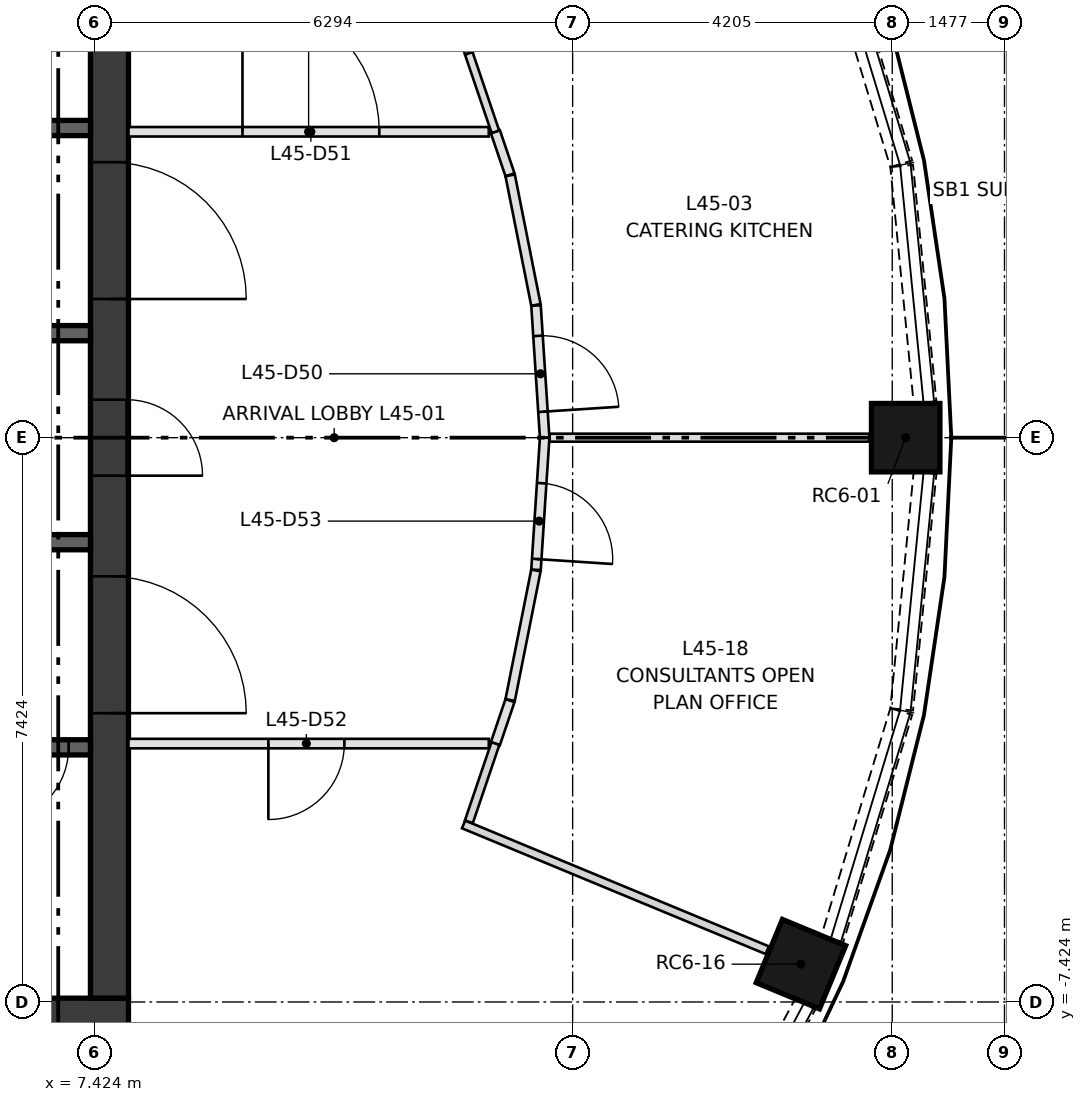
"""IFC4 building model, lengths in metres.
Left out: names, types, materials, properties, quantities, classifications, styles, units other than length and angle.
Written with IfcOpenShell. Run it as: python <this file> out.ifc"""

import sys

from ifc_helpers import new_model, si_unit, direction, frame, frame_2d, origin, origin_2d, place, context, subcontext, project, spatial, rectangle, extrude, element, fill, save


model = new_model("IFC4")
c1 = context("Model", 3, precision=1e-05, world=origin(), true_north=direction((0.0, 1.0)))
c2 = subcontext(c1, "Body", "Model", "MODEL_VIEW")
j1 = project(units=[si_unit("LENGTHUNIT", "METRE"), si_unit("PLANEANGLEUNIT", "RADIAN")], contexts=[c1])
p1 = place(None, origin())
s1 = spatial("IfcSite", under=j1, at=p1, CompositionType="ELEMENT")
p2 = place(p1, origin())
s2 = spatial("IfcBuilding", under=s1, at=p2, CompositionType="ELEMENT")
p3 = place(p2, frame((0.0, 0.0, 170.9)))
s3 = spatial("IfcBuildingStorey", under=s2, at=p3, CompositionType="ELEMENT", Elevation=170.9)
for number, where, z_axis, x_axis in (
    (1, (18.1, 0.0, 0.0), (0.0, 0.0, 1.0), (1.0, 0.0, 0.0)),
    (2, (16.722, -6.927, 0.0), (0.0, 0.0, 1.0), (0.924, -0.383, 0.0)),
):
    element("IfcColumn", number, at=place(p3, frame(where, z_axis=z_axis, x_axis=x_axis)), inside=s3, PredefinedType="COLUMN", context=c2, shape_type="SweptSolid", body=[
        extrude(rectangle(XDim=0.9, YDim=0.9, at=origin_2d()), origin(), (0.0, 0.0, 1.0), 3.35),
    ])
p4 = place(p3, frame((-7.874, -7.624, 0.0), z_axis=(0.0, 0.0, 1.0), x_axis=(1.0, 0.0, 0.0)))
e3 = element("IfcWall", 3, at=p4, inside=s3, PredefinedType="SHEAR", context=c2, shape_type="SweptSolid", body=[
    extrude(rectangle(XDim=15.748, YDim=0.5, at=frame_2d((7.874, 0.0))), origin(), (0.0, 0.0, 1.0), 3.35),
])
p5 = place(p3, frame((7.624, -7.374, 0.0), z_axis=(0.0, 0.0, 1.0), x_axis=(0.0, 1.0, 0.0)))
e4 = element("IfcWall", 4, at=p5, inside=s3, PredefinedType="SHEAR", context=c2, shape_type="SweptSolid", body=[
    extrude(rectangle(XDim=14.748, YDim=0.5, at=frame_2d((7.374, 0.0))), origin(), (0.0, 0.0, 1.0), 3.35),
])
p6 = place(p5, frame((6.874, 0.0, 0.0)))
e5 = element("IfcOpeningElement", 5, at=p6, cuts=e4, PredefinedType="OPENING", context=c2, shape_type="SweptSolid", body=[
    extrude(rectangle(XDim=1.0, YDim=2.1, at=frame_2d((0.5, 1.05))), frame((0.0, 0.26, 0.0), z_axis=(0.0, -1.0, 0.0), x_axis=(1.0, 0.0, 0.0)), (0.0, 0.0, 1.0), 0.52),
])
p7 = place(p5, frame((3.75, 0.0, 0.0)))
e6 = element("IfcOpeningElement", 6, at=p7, cuts=e4, PredefinedType="OPENING", context=c2, shape_type="SweptSolid", body=[
    extrude(rectangle(XDim=1.8, YDim=2.1, at=frame_2d((0.9, 1.05))), frame((0.0, 0.26, 0.0), z_axis=(0.0, -1.0, 0.0), x_axis=(1.0, 0.0, 0.0)), (0.0, 0.0, 1.0), 0.52),
])
p8 = place(p5, frame((9.198, 0.0, 0.0)))
e7 = element("IfcOpeningElement", 7, at=p8, cuts=e4, PredefinedType="OPENING", context=c2, shape_type="SweptSolid", body=[
    extrude(rectangle(XDim=1.8, YDim=2.1, at=frame_2d((0.9, 1.05))), frame((0.0, 0.26, 0.0), z_axis=(0.0, -1.0, 0.0), x_axis=(1.0, 0.0, 0.0)), (0.0, 0.0, 1.0), 0.52),
])
p9 = place(p3, frame((-7.374, -4.074, 0.0), z_axis=(0.0, 0.0, 1.0), x_axis=(1.0, 0.0, 0.0)))
e8 = element("IfcWall", 8, at=p9, inside=s3, PredefinedType="SHEAR", context=c2, shape_type="SweptSolid", body=[
    extrude(rectangle(XDim=14.748, YDim=0.2, at=frame_2d((7.374, 0.0))), origin(), (0.0, 0.0, 1.0), 3.0),
])
p10 = place(p9, frame((1.319, 0.0, 0.0)))
e9 = element("IfcOpeningElement", 9, at=p10, cuts=e8, PredefinedType="OPENING", context=c2, shape_type="SweptSolid", body=[
    extrude(rectangle(XDim=1.1, YDim=2.1, at=frame_2d((0.55, 1.05))), frame((0.0, 0.11, 0.0), z_axis=(0.0, -1.0, 0.0), x_axis=(1.0, 0.0, 0.0)), (0.0, 0.0, 1.0), 0.22),
])
p11 = place(p9, frame((4.456, 0.0, 0.0)))
e10 = element("IfcOpeningElement", 10, at=p11, cuts=e8, PredefinedType="OPENING", context=c2, shape_type="SweptSolid", body=[
    extrude(rectangle(XDim=1.1, YDim=2.1, at=frame_2d((0.55, 1.05))), frame((0.0, 0.11, 0.0), z_axis=(0.0, -1.0, 0.0), x_axis=(1.0, 0.0, 0.0)), (0.0, 0.0, 1.0), 0.22),
])
p12 = place(p9, frame((7.551, 0.0, 0.0)))
e11 = element("IfcOpeningElement", 11, at=p12, cuts=e8, PredefinedType="OPENING", context=c2, shape_type="SweptSolid", body=[
    extrude(rectangle(XDim=1.0, YDim=2.1, at=frame_2d((0.5, 1.05))), frame((0.0, 0.11, 0.0), z_axis=(0.0, -1.0, 0.0), x_axis=(1.0, 0.0, 0.0)), (0.0, 0.0, 1.0), 0.22),
])
p13 = place(p9, frame((9.914, 0.0, 0.0)))
e12 = element("IfcOpeningElement", 12, at=p13, cuts=e8, PredefinedType="OPENING", context=c2, shape_type="SweptSolid", body=[
    extrude(rectangle(XDim=1.0, YDim=2.1, at=frame_2d((0.5, 1.05))), frame((0.0, 0.11, 0.0), z_axis=(0.0, -1.0, 0.0), x_axis=(1.0, 0.0, 0.0)), (0.0, 0.0, 1.0), 0.22),
])
p14 = place(p9, frame((11.688, 0.0, 0.0)))
e13 = element("IfcOpeningElement", 13, at=p14, cuts=e8, PredefinedType="OPENING", context=c2, shape_type="SweptSolid", body=[
    extrude(rectangle(XDim=1.0, YDim=2.1, at=frame_2d((0.5, 1.05))), frame((0.0, 0.11, 0.0), z_axis=(0.0, -1.0, 0.0), x_axis=(1.0, 0.0, 0.0)), (0.0, 0.0, 1.0), 0.22),
])
p15 = place(p9, frame((13.461, 0.0, 0.0)))
e14 = element("IfcOpeningElement", 14, at=p15, cuts=e8, PredefinedType="OPENING", context=c2, shape_type="SweptSolid", body=[
    extrude(rectangle(XDim=1.0, YDim=2.1, at=frame_2d((0.5, 1.05))), frame((0.0, 0.11, 0.0), z_axis=(0.0, -1.0, 0.0), x_axis=(1.0, 0.0, 0.0)), (0.0, 0.0, 1.0), 0.22),
])
p16 = place(p3, frame((0.0, 4.074, 0.0), z_axis=(0.0, 0.0, 1.0), x_axis=(1.0, 0.0, 0.0)))
e15 = element("IfcWall", 15, at=p16, inside=s3, PredefinedType="SHEAR", context=c2, shape_type="SweptSolid", body=[
    extrude(rectangle(XDim=7.374, YDim=0.2, at=frame_2d((3.687, 0.0))), origin(), (0.0, 0.0, 1.0), 3.0),
])
p17 = place(p16, frame((0.384, 0.0, 0.0)))
e16 = element("IfcOpeningElement", 16, at=p17, cuts=e15, PredefinedType="OPENING", context=c2, shape_type="SweptSolid", body=[
    extrude(rectangle(XDim=1.0, YDim=2.1, at=frame_2d((0.5, 1.05))), frame((0.0, 0.11, 0.0), z_axis=(0.0, -1.0, 0.0), x_axis=(1.0, 0.0, 0.0)), (0.0, 0.0, 1.0), 0.22),
])
p18 = place(p16, frame((2.153, 0.0, 0.0)))
e17 = element("IfcOpeningElement", 17, at=p18, cuts=e15, PredefinedType="OPENING", context=c2, shape_type="SweptSolid", body=[
    extrude(rectangle(XDim=1.0, YDim=2.1, at=frame_2d((0.5, 1.05))), frame((0.0, 0.11, 0.0), z_axis=(0.0, -1.0, 0.0), x_axis=(1.0, 0.0, 0.0)), (0.0, 0.0, 1.0), 0.22),
])
p19 = place(p16, frame((3.921, 0.0, 0.0)))
e18 = element("IfcOpeningElement", 18, at=p19, cuts=e15, PredefinedType="OPENING", context=c2, shape_type="SweptSolid", body=[
    extrude(rectangle(XDim=1.0, YDim=2.1, at=frame_2d((0.5, 1.05))), frame((0.0, 0.11, 0.0), z_axis=(0.0, -1.0, 0.0), x_axis=(1.0, 0.0, 0.0)), (0.0, 0.0, 1.0), 0.22),
])
p20 = place(p16, frame((5.79, 0.0, 0.0)))
e19 = element("IfcOpeningElement", 19, at=p20, cuts=e15, PredefinedType="OPENING", context=c2, shape_type="SweptSolid", body=[
    extrude(rectangle(XDim=0.8, YDim=2.1, at=frame_2d((0.4, 1.05))), frame((0.0, 0.11, 0.0), z_axis=(0.0, -1.0, 0.0), x_axis=(1.0, 0.0, 0.0)), (0.0, 0.0, 1.0), 0.22),
])
for number, where, z_axis, x_axis in (
    (20, (4.374, -1.375, 0.0), (0.0, 0.0, 1.0), (1.0, 0.0, 0.0)),
    (21, (4.374, 1.375, 0.0), (0.0, 0.0, 1.0), (1.0, 0.0, 0.0)),
):
    element("IfcWall", number, at=place(p3, frame(where, z_axis=z_axis, x_axis=x_axis)), inside=s3, PredefinedType="SHEAR", context=c2, shape_type="SweptSolid", body=[
        extrude(rectangle(XDim=3.0, YDim=0.2, at=frame_2d((1.5, 0.0))), origin(), (0.0, 0.0, 1.0), 3.0),
    ])
p21 = place(p3, frame((18.354, 0.464, 0.0), z_axis=(0.0, 0.0, 1.0), x_axis=(-0.098188848083, 0.995167799978, 0.0)))
e22 = element("IfcWall", 22, at=p21, inside=s3, PredefinedType="SOLIDWALL", context=c2, shape_type="SweptSolid", body=[
    extrude(rectangle(XDim=3.125, YDim=0.3, at=frame_2d((1.563, 0.0))), origin(), (0.0, 0.0, 1.0), 0.9),
])
p22 = place(p3, frame((18.042, 3.604, 0.0), z_axis=(0.0, 0.0, 1.0), x_axis=(-0.290083245834, 0.957001416136, 0.0)))
e23 = element("IfcWall", 23, at=p22, inside=s3, PredefinedType="SOLIDWALL", context=c2, shape_type="SweptSolid", body=[
    extrude(rectangle(XDim=3.127, YDim=0.3, at=frame_2d((1.563, 0.0))), origin(), (0.0, 0.0, 1.0), 0.9),
])
p23 = place(p3, frame((15.306, -10.209, 0.0), z_axis=(0.0, 0.0, 1.0), x_axis=(0.47120441036, 0.882024038027, 0.0)))
e24 = element("IfcWall", 24, at=p23, inside=s3, PredefinedType="SOLIDWALL", context=c2, shape_type="SweptSolid", body=[
    extrude(rectangle(XDim=3.125, YDim=0.3, at=frame_2d((1.562, 0.0))), origin(), (0.0, 0.0, 1.0), 0.9),
])
p24 = place(p3, frame((17.135, -6.596, 0.0), z_axis=(0.0, 0.0, 1.0), x_axis=(0.290083245834, 0.957001416136, 0.0)))
e25 = element("IfcWall", 25, at=p24, inside=s3, PredefinedType="SOLIDWALL", context=c2, shape_type="SweptSolid", body=[
    extrude(rectangle(XDim=3.127, YDim=0.3, at=frame_2d((1.563, 0.0))), origin(), (0.0, 0.0, 1.0), 0.9),
])
p25 = place(p3, frame((18.048, -3.574, 0.0), z_axis=(0.0, 0.0, 1.0), x_axis=(0.098188848083, 0.995167799978, 0.0)))
e26 = element("IfcWall", 26, at=p25, inside=s3, PredefinedType="SOLIDWALL", context=c2, shape_type="SweptSolid", body=[
    extrude(rectangle(XDim=3.125, YDim=0.3, at=frame_2d((1.563, 0.0))), origin(), (0.0, 0.0, 1.0), 0.9),
])
p26 = place(p3, frame((12.702, 4.024, 0.0), z_axis=(0.0, 0.0, 1.0), x_axis=(0.321374914787, -0.946952038989, 0.0)))
e27 = element("IfcWall", 27, at=p26, inside=s3, PredefinedType="PARTITIONING", context=c2, shape_type="SweptSolid", body=[
    extrude(rectangle(XDim=0.597, YDim=0.125, at=frame_2d((0.299, 0.0))), origin(), (0.0, 0.0, 1.0), 3.0),
])
p27 = place(p3, frame((12.896, 3.451, 0.0), z_axis=(0.0, 0.0, 1.0), x_axis=(0.195116516296, -0.980780069673, 0.0)))
e28 = element("IfcWall", 28, at=p27, inside=s3, PredefinedType="PARTITIONING", context=c2, shape_type="SweptSolid", body=[
    extrude(rectangle(XDim=1.738, YDim=0.125, at=frame_2d((0.869, 0.0))), origin(), (0.0, 0.0, 1.0), 3.0),
])
p28 = place(p3, frame((13.236, 1.738, 0.0), z_axis=(0.0, 0.0, 1.0), x_axis=(0.065449256286, -0.997855898841, 0.0)))
e29 = element("IfcWall", 29, at=p28, inside=s3, PredefinedType="PARTITIONING", context=c2, shape_type="SweptSolid", body=[
    extrude(rectangle(XDim=1.742, YDim=0.125, at=frame_2d((0.871, 0.0))), origin(), (0.0, 0.0, 1.0), 3.0),
])
p29 = place(p28, frame((0.4, 0.0, 0.0)))
e30 = element("IfcOpeningElement", 30, at=p29, cuts=e29, PredefinedType="OPENING", context=c2, shape_type="SweptSolid", body=[
    extrude(rectangle(XDim=1.0, YDim=2.1, at=frame_2d((0.5, 1.05))), frame((0.0, 0.073, 0.0), z_axis=(0.0, -1.0, 0.0), x_axis=(1.0, 0.0, 0.0)), (0.0, 0.0, 1.0), 0.145),
])
p30 = place(p3, frame((7.874, 4.024, 0.0), z_axis=(0.0, 0.0, 1.0), x_axis=(1.0, 0.0, 0.0)))
e31 = element("IfcWall", 31, at=p30, inside=s3, PredefinedType="PARTITIONING", context=c2, shape_type="SweptSolid", body=[
    extrude(rectangle(XDim=4.741, YDim=0.125, at=frame_2d((2.37, 0.0))), origin(), (0.0, 0.0, 1.0), 3.0),
])
p31 = place(p30, frame((1.5, 0.0, 0.0)))
e32 = element("IfcOpeningElement", 32, at=p31, cuts=e31, PredefinedType="OPENING", context=c2, shape_type="SweptSolid", body=[
    extrude(rectangle(XDim=1.8, YDim=2.1, at=frame_2d((0.9, 1.05))), frame((0.0, 0.073, 0.0), z_axis=(0.0, -1.0, 0.0), x_axis=(1.0, 0.0, 0.0)), (0.0, 0.0, 1.0), 0.145),
])
p32 = place(p3, frame((12.615, -4.024, 0.0), z_axis=(0.0, 0.0, 1.0), x_axis=(-1.0, 0.0, 0.0)))
e33 = element("IfcWall", 33, at=p32, inside=s3, PredefinedType="PARTITIONING", context=c2, shape_type="SweptSolid", body=[
    extrude(rectangle(XDim=4.741, YDim=0.125, at=frame_2d((2.37, 0.0))), origin(), (0.0, 0.0, 1.0), 3.0),
])
p33 = place(p32, frame((1.9, 0.0, 0.0)))
e34 = element("IfcOpeningElement", 34, at=p33, cuts=e33, PredefinedType="OPENING", context=c2, shape_type="SweptSolid", body=[
    extrude(rectangle(XDim=1.0, YDim=2.1, at=frame_2d((0.5, 1.05))), frame((0.0, 0.073, 0.0), z_axis=(0.0, -1.0, 0.0), x_axis=(1.0, 0.0, 0.0)), (0.0, 0.0, 1.0), 0.145),
])
p34 = place(p3, frame((12.894, -3.459, 0.0), z_axis=(0.0, 0.0, 1.0), x_axis=(-0.321374914787, -0.946952038989, 0.0)))
e35 = element("IfcWall", 35, at=p34, inside=s3, PredefinedType="PARTITIONING", context=c2, shape_type="SweptSolid", body=[
    extrude(rectangle(XDim=0.597, YDim=0.125, at=frame_2d((0.299, 0.0))), origin(), (0.0, 0.0, 1.0), 3.0),
])
p35 = place(p3, frame((13.235, -1.747, 0.0), z_axis=(0.0, 0.0, 1.0), x_axis=(-0.195116516296, -0.980780069673, 0.0)))
e36 = element("IfcWall", 36, at=p35, inside=s3, PredefinedType="PARTITIONING", context=c2, shape_type="SweptSolid", body=[
    extrude(rectangle(XDim=1.738, YDim=0.125, at=frame_2d((0.869, 0.0))), origin(), (0.0, 0.0, 1.0), 3.0),
])
p36 = place(p3, frame((13.35, 0.0, 0.0), z_axis=(0.0, 0.0, 1.0), x_axis=(-0.065449256286, -0.997855898841, 0.0)))
e37 = element("IfcWall", 37, at=p36, inside=s3, PredefinedType="PARTITIONING", context=c2, shape_type="SweptSolid", body=[
    extrude(rectangle(XDim=1.742, YDim=0.125, at=frame_2d((0.871, 0.0))), origin(), (0.0, 0.0, 1.0), 3.0),
])
p37 = place(p36, frame((0.6, 0.0, 0.0)))
e38 = element("IfcOpeningElement", 38, at=p37, cuts=e37, PredefinedType="OPENING", context=c2, shape_type="SweptSolid", body=[
    extrude(rectangle(XDim=1.0, YDim=2.1, at=frame_2d((0.5, 1.05))), frame((0.0, 0.073, 0.0), z_axis=(0.0, -1.0, 0.0), x_axis=(1.0, 0.0, 0.0)), (0.0, 0.0, 1.0), 0.145),
])
p38 = place(p3, frame((12.285, 5.089, 0.0), z_axis=(0.0, 0.0, 1.0), x_axis=(0.923865378524, 0.382717601325, 0.0)))
e39 = element("IfcWall", 39, at=p38, inside=s3, PredefinedType="PARTITIONING", context=c2, shape_type="SweptSolid", body=[
    extrude(rectangle(XDim=4.323, YDim=0.105, at=frame_2d((2.161, 0.0))), origin(), (0.0, 0.0, 1.0), 3.0),
])
p39 = place(p3, frame((12.702, 4.024, 0.0), z_axis=(0.0, 0.0, 1.0), x_axis=(-0.321468654442, 0.946920220616, 0.0)))
e40 = element("IfcWall", 40, at=p39, inside=s3, PredefinedType="PARTITIONING", context=c2, shape_type="SweptSolid", body=[
    extrude(rectangle(XDim=1.089, YDim=0.105, at=frame_2d((0.544, 0.0))), origin(), (0.0, 0.0, 1.0), 3.0),
])
p40 = place(p3, frame((17.62, 0.0, 0.0), z_axis=(0.0, 0.0, 1.0), x_axis=(-1.0, 0.0, 0.0)))
e41 = element("IfcWall", 41, at=p40, inside=s3, PredefinedType="PARTITIONING", context=c2, shape_type="SweptSolid", body=[
    extrude(rectangle(XDim=4.204, YDim=0.105, at=frame_2d((2.102, 0.0))), origin(), (0.0, 0.0, 1.0), 3.0),
])
p41 = place(p3, frame((12.283, -5.088, 0.0), z_axis=(0.0, 0.0, 1.0), x_axis=(0.923888181348, -0.382662551559, 0.0)))
e42 = element("IfcWall", 42, at=p41, inside=s3, PredefinedType="PARTITIONING", context=c2, shape_type="SweptSolid", body=[
    extrude(rectangle(XDim=4.325, YDim=0.11, at=frame_2d((2.163, 0.0))), origin(), (0.0, 0.0, 1.0), 3.0),
])
p42 = place(p3, frame((12.702, -4.024, 0.0), z_axis=(0.0, 0.0, 1.0), x_axis=(-0.321346724307, -0.946961605756, 0.0)))
e43 = element("IfcWall", 43, at=p42, inside=s3, PredefinedType="PARTITIONING", context=c2, shape_type="SweptSolid", body=[
    extrude(rectangle(XDim=1.086, YDim=0.11, at=frame_2d((0.543, 0.0))), origin(), (0.0, 0.0, 1.0), 3.0),
])
p43 = place(p15, frame((1.0, 0.0, 0.0), z_axis=(0.0, 0.0, 1.0), x_axis=(-1.0, 0.0, 0.0)))
e44 = element("IfcDoor", 44, at=p43, inside=s3, OperationType="SINGLE_SWING_LEFT", PredefinedType="DOOR", context=c2, shape_type="SweptSolid", body=[
    extrude(rectangle(XDim=1.0, YDim=2.1, at=frame_2d((0.5, 1.05))), frame((0.0, 0.025, 0.0), z_axis=(0.0, -1.0, 0.0), x_axis=(1.0, 0.0, 0.0)), (0.0, 0.0, 1.0), 0.05),
])
fill(e14, e44)
p44 = place(p6, frame((1.0, 0.0, 0.0), z_axis=(0.0, 0.0, 1.0), x_axis=(-1.0, 0.0, 0.0)))
e45 = element("IfcDoor", 45, at=p44, inside=s3, OperationType="SINGLE_SWING_LEFT", PredefinedType="DOOR", context=c2, shape_type="SweptSolid", body=[
    extrude(rectangle(XDim=1.0, YDim=2.1, at=frame_2d((0.5, 1.05))), frame((0.0, 0.25, 0.0), z_axis=(0.0, -1.0, 0.0), x_axis=(1.0, 0.0, 0.0)), (0.0, 0.0, 1.0), 0.05),
])
fill(e5, e45)
p45 = place(p7, frame((1.8, 0.0, 0.0), z_axis=(0.0, 0.0, 1.0), x_axis=(-1.0, 0.0, 0.0)))
e46 = element("IfcDoor", 46, at=p45, inside=s3, OperationType="DOUBLE_DOOR_SINGLE_SWING", PredefinedType="DOOR", context=c2, shape_type="SweptSolid", body=[
    extrude(rectangle(XDim=1.8, YDim=2.1, at=frame_2d((0.9, 1.05))), frame((0.0, 0.025, 0.0), z_axis=(0.0, -1.0, 0.0), x_axis=(1.0, 0.0, 0.0)), (0.0, 0.0, 1.0), 0.05),
])
fill(e6, e46)
p46 = place(p8, frame((1.8, 0.0, 0.0), z_axis=(0.0, 0.0, 1.0), x_axis=(-1.0, 0.0, 0.0)))
e47 = element("IfcDoor", 47, at=p46, inside=s3, OperationType="DOUBLE_DOOR_SINGLE_SWING", PredefinedType="DOOR", context=c2, shape_type="SweptSolid", body=[
    extrude(rectangle(XDim=1.8, YDim=2.1, at=frame_2d((0.9, 1.05))), frame((0.0, 0.025, 0.0), z_axis=(0.0, -1.0, 0.0), x_axis=(1.0, 0.0, 0.0)), (0.0, 0.0, 1.0), 0.05),
])
fill(e7, e47)
p47 = place(p29, origin())
e48 = element("IfcDoor", 48, at=p47, inside=s3, OperationType="SINGLE_SWING_RIGHT", PredefinedType="DOOR", context=c2, shape_type="SweptSolid", body=[
    extrude(rectangle(XDim=1.0, YDim=2.1, at=frame_2d((0.5, 1.05))), frame((0.0, 0.025, 0.0), z_axis=(0.0, -1.0, 0.0), x_axis=(1.0, 0.0, 0.0)), (0.0, 0.0, 1.0), 0.05),
])
fill(e30, e48)
p48 = place(p31, origin())
e49 = element("IfcDoor", 49, at=p48, inside=s3, OperationType="DOUBLE_DOOR_SINGLE_SWING", PredefinedType="DOOR", context=c2, shape_type="SweptSolid", body=[
    extrude(rectangle(XDim=1.8, YDim=2.1, at=frame_2d((0.9, 1.05))), frame((0.0, 0.025, 0.0), z_axis=(0.0, -1.0, 0.0), x_axis=(1.0, 0.0, 0.0)), (0.0, 0.0, 1.0), 0.05),
])
fill(e32, e49)
p49 = place(p33, origin())
e50 = element("IfcDoor", 50, at=p49, inside=s3, OperationType="SINGLE_SWING_RIGHT", PredefinedType="DOOR", context=c2, shape_type="SweptSolid", body=[
    extrude(rectangle(XDim=1.0, YDim=2.1, at=frame_2d((0.5, 1.05))), frame((0.0, 0.025, 0.0), z_axis=(0.0, -1.0, 0.0), x_axis=(1.0, 0.0, 0.0)), (0.0, 0.0, 1.0), 0.05),
])
fill(e34, e50)
p50 = place(p37, origin())
e51 = element("IfcDoor", 51, at=p50, inside=s3, OperationType="SINGLE_SWING_RIGHT", PredefinedType="DOOR", context=c2, shape_type="SweptSolid", body=[
    extrude(rectangle(XDim=1.0, YDim=2.1, at=frame_2d((0.5, 1.05))), frame((0.0, 0.025, 0.0), z_axis=(0.0, -1.0, 0.0), x_axis=(1.0, 0.0, 0.0)), (0.0, 0.0, 1.0), 0.05),
])
fill(e38, e51)
save(model, sys.argv[1])
